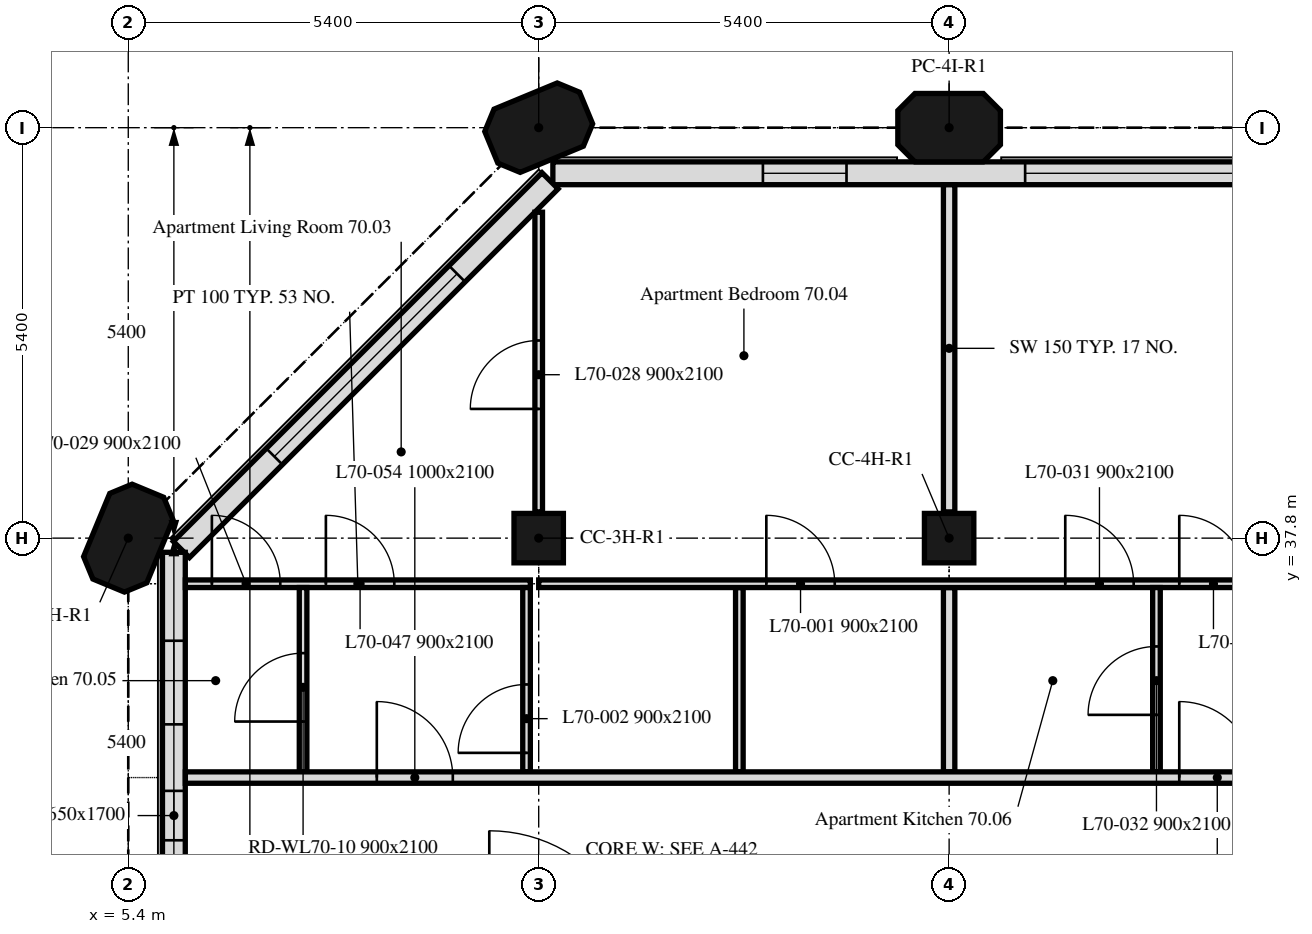
"""IFC4 building model, lengths in metres.
Left out: names, types, materials, properties, quantities, classifications, styles, units other than length and angle.
Written with IfcOpenShell. Run it as: python <this file> out.ifc"""

import sys

from ifc_helpers import new_model, si_unit, direction, frame, frame_2d, origin, origin_2d, place, context, subcontext, project, spatial, polyline, rectangle, outline, extrude, element, fill, save


model = new_model("IFC4")
c1 = context("Model", 3, precision=1e-05, world=origin(), true_north=direction((0.0, 1.0)))
c2 = subcontext(c1, "Body", "Model", "MODEL_VIEW")
j1 = project(units=[si_unit("LENGTHUNIT", "METRE"), si_unit("PLANEANGLEUNIT", "RADIAN")], contexts=[c1])
p1 = place(None, origin())
s1 = spatial("IfcSite", under=j1, at=p1, CompositionType="ELEMENT")
p2 = place(p1, origin())
s2 = spatial("IfcBuilding", under=s1, at=p2, CompositionType="ELEMENT")
p3 = place(p2, frame((0.0, 0.0, 285.1)))
s3 = spatial("IfcBuildingStorey", under=s2, at=p3, CompositionType="ELEMENT", Elevation=285.1)
p4 = place(p3, frame((5.4, 37.8, 0.0), z_axis=(0.0, 0.0, 1.0), x_axis=(0.382683432365, 0.923879532511, 0.0)))
e1 = element("IfcColumn", 1, at=p4, inside=s3, PredefinedType="COLUMN", context=c2, shape_type="SweptSolid", body=[
    extrude(outline(polyline([(-0.45, -0.45), (0.45, -0.45), (0.675, -0.225), (0.675, 0.225), (0.45, 0.45), (-0.45, 0.45), (-0.675, 0.225), (-0.675, -0.225), (-0.45, -0.45)])), origin(), (0.0, 0.0, 1.0), 3.0),
])
for number, where, z_axis, x_axis in (
    (2, (10.8, 37.8, 0.0), (0.0, 0.0, 1.0), (1.0, 0.0, 0.0)),
    (3, (16.2, 37.8, 0.0), (0.0, 0.0, 1.0), (1.0, 0.0, 0.0)),
):
    element("IfcColumn", number, at=place(p3, frame(where, z_axis=z_axis, x_axis=x_axis)), inside=s3, PredefinedType="COLUMN", context=c2, shape_type="SweptSolid", body=[
        extrude(rectangle(XDim=0.65, YDim=0.65, at=origin_2d()), origin(), (0.0, 0.0, 1.0), 3.0),
    ])
for number, where, z_axis, x_axis in (
    (4, (10.8, 43.2, 0.0), (0.0, 0.0, 1.0), (0.924, 0.383, 0.0)),
    (5, (16.2, 43.2, 0.0), (0.0, 0.0, 1.0), (1.0, 0.0, 0.0)),
):
    element("IfcColumn", number, at=place(p3, frame(where, z_axis=z_axis, x_axis=x_axis)), inside=s3, PredefinedType="COLUMN", context=c2, shape_type="SweptSolid", body=[
        extrude(outline(polyline([(-0.45, -0.45), (0.45, -0.45), (0.675, -0.225), (0.675, 0.225), (0.45, 0.45), (-0.45, 0.45), (-0.675, 0.225), (-0.675, -0.225), (-0.45, -0.45)])), origin(), (0.0, 0.0, 1.0), 3.0),
    ])
p5 = place(p3, frame((43.014, 42.6, 0.0), z_axis=(0.0, 0.0, 1.0), x_axis=(-1.0, 0.0, 0.0)))
e6 = element("IfcWall", 6, at=p5, inside=s3, PredefinedType="SOLIDWALL", context=c2, shape_type="SweptSolid", body=[
    extrude(rectangle(XDim=32.027, YDim=0.3, at=frame_2d((16.014, 0.0))), origin(), (0.0, 0.0, 1.0), 3.0),
])
p6 = place(p5, frame((0.814, 0.0, 0.9)))
e7 = element("IfcOpeningElement", 7, at=p6, cuts=e6, PredefinedType="OPENING", context=c2, shape_type="SweptSolid", body=[
    extrude(rectangle(XDim=3.4, YDim=1.7, at=frame_2d((1.7, 0.85))), frame((0.0, 0.16, 0.0), z_axis=(0.0, -1.0, 0.0), x_axis=(1.0, 0.0, 0.0)), (0.0, 0.0, 1.0), 0.32),
])
p7 = place(p5, frame((6.564, 0.0, 0.9)))
e8 = element("IfcOpeningElement", 8, at=p7, cuts=e6, PredefinedType="OPENING", context=c2, shape_type="SweptSolid", body=[
    extrude(rectangle(XDim=1.1, YDim=1.7, at=frame_2d((0.55, 0.85))), frame((0.0, 0.16, 0.0), z_axis=(0.0, -1.0, 0.0), x_axis=(1.0, 0.0, 0.0)), (0.0, 0.0, 1.0), 0.32),
])
p8 = place(p5, frame((11.614, 0.0, 0.9)))
e9 = element("IfcOpeningElement", 9, at=p8, cuts=e6, PredefinedType="OPENING", context=c2, shape_type="SweptSolid", body=[
    extrude(rectangle(XDim=3.4, YDim=1.7, at=frame_2d((1.7, 0.85))), frame((0.0, 0.16, 0.0), z_axis=(0.0, -1.0, 0.0), x_axis=(1.0, 0.0, 0.0)), (0.0, 0.0, 1.0), 0.32),
])
p9 = place(p5, frame((17.364, 0.0, 0.9)))
e10 = element("IfcOpeningElement", 10, at=p9, cuts=e6, PredefinedType="OPENING", context=c2, shape_type="SweptSolid", body=[
    extrude(rectangle(XDim=1.1, YDim=1.7, at=frame_2d((0.55, 0.85))), frame((0.0, 0.16, 0.0), z_axis=(0.0, -1.0, 0.0), x_axis=(1.0, 0.0, 0.0)), (0.0, 0.0, 1.0), 0.32),
])
p10 = place(p5, frame((22.414, 0.0, 0.9)))
e11 = element("IfcOpeningElement", 11, at=p10, cuts=e6, PredefinedType="OPENING", context=c2, shape_type="SweptSolid", body=[
    extrude(rectangle(XDim=3.4, YDim=1.7, at=frame_2d((1.7, 0.85))), frame((0.0, 0.16, 0.0), z_axis=(0.0, -1.0, 0.0), x_axis=(1.0, 0.0, 0.0)), (0.0, 0.0, 1.0), 0.32),
])
p11 = place(p5, frame((28.164, 0.0, 0.9)))
e12 = element("IfcOpeningElement", 12, at=p11, cuts=e6, PredefinedType="OPENING", context=c2, shape_type="SweptSolid", body=[
    extrude(rectangle(XDim=1.1, YDim=1.7, at=frame_2d((0.55, 0.85))), frame((0.0, 0.16, 0.0), z_axis=(0.0, -1.0, 0.0), x_axis=(1.0, 0.0, 0.0)), (0.0, 0.0, 1.0), 0.32),
])
p12 = place(p3, frame((10.949, 42.501, 0.0), z_axis=(0.0, 0.0, 1.0), x_axis=(-0.707106781187, -0.707106781187, 0.0)))
e13 = element("IfcWall", 13, at=p12, inside=s3, PredefinedType="SOLIDWALL", context=c2, shape_type="SweptSolid", body=[
    extrude(rectangle(XDim=6.86, YDim=0.3, at=frame_2d((3.43, 0.0))), origin(), (0.0, 0.0, 1.0), 3.0),
])
p13 = place(p12, frame((1.73, 0.0, 0.9)))
e14 = element("IfcOpeningElement", 14, at=p13, cuts=e13, PredefinedType="OPENING", context=c2, shape_type="SweptSolid", body=[
    extrude(rectangle(XDim=3.4, YDim=1.7, at=frame_2d((1.7, 0.85))), frame((0.0, 0.16, 0.0), z_axis=(0.0, -1.0, 0.0), x_axis=(1.0, 0.0, 0.0)), (0.0, 0.0, 1.0), 0.32),
])
p14 = place(p3, frame((6.0, 37.614, 0.0), z_axis=(0.0, 0.0, 1.0), x_axis=(0.0, -1.0, 0.0)))
e15 = element("IfcWall", 15, at=p14, inside=s3, PredefinedType="SOLIDWALL", context=c2, shape_type="SweptSolid", body=[
    extrude(rectangle(XDim=5.214, YDim=0.3, at=frame_2d((2.607, 0.0))), origin(), (0.0, 0.0, 1.0), 3.0),
])
p15 = place(p14, frame((1.164, 0.0, 0.9)))
e16 = element("IfcOpeningElement", 16, at=p15, cuts=e15, PredefinedType="OPENING", context=c2, shape_type="SweptSolid", body=[
    extrude(rectangle(XDim=1.1, YDim=1.7, at=frame_2d((0.55, 0.85))), frame((0.0, 0.16, 0.0), z_axis=(0.0, -1.0, 0.0), x_axis=(1.0, 0.0, 0.0)), (0.0, 0.0, 1.0), 0.32),
])
p16 = place(p14, frame((3.139, 0.0, 0.9)))
e17 = element("IfcOpeningElement", 17, at=p16, cuts=e15, PredefinedType="OPENING", context=c2, shape_type="SweptSolid", body=[
    extrude(rectangle(XDim=0.65, YDim=1.7, at=frame_2d((0.325, 0.85))), frame((0.0, 0.16, 0.0), z_axis=(0.0, -1.0, 0.0), x_axis=(1.0, 0.0, 0.0)), (0.0, 0.0, 1.0), 0.32),
])
p17 = place(p3, frame((6.151, 37.2, 0.0), z_axis=(0.0, 0.0, 1.0), x_axis=(1.0, 0.0, 0.0)))
e18 = element("IfcWall", 18, at=p17, inside=s3, PredefinedType="PARTITIONING", context=c2, shape_type="SweptSolid", body=[
    extrude(rectangle(XDim=4.539, YDim=0.1, at=frame_2d((2.27, 0.0))), origin(), (0.0, 0.0, 1.0), 3.0),
])
p18 = place(p17, frame((0.349, 0.0, 0.0)))
e19 = element("IfcOpeningElement", 19, at=p18, cuts=e18, PredefinedType="OPENING", context=c2, shape_type="SweptSolid", body=[
    extrude(rectangle(XDim=0.9, YDim=2.1, at=frame_2d((0.45, 1.05))), frame((0.0, 0.05, 0.0), z_axis=(0.0, -1.0, 0.0), x_axis=(1.0, 0.0, 0.0)), (0.0, 0.0, 1.0), 0.1),
])
p19 = place(p17, frame((1.849, 0.0, 0.0)))
e20 = element("IfcOpeningElement", 20, at=p19, cuts=e18, PredefinedType="OPENING", context=c2, shape_type="SweptSolid", body=[
    extrude(rectangle(XDim=0.9, YDim=2.1, at=frame_2d((0.45, 1.05))), frame((0.0, 0.05, 0.0), z_axis=(0.0, -1.0, 0.0), x_axis=(1.0, 0.0, 0.0)), (0.0, 0.0, 1.0), 0.1),
])
p20 = place(p3, frame((10.8, 38.145, 0.0), z_axis=(0.0, 0.0, 1.0), x_axis=(0.0, 1.0, 0.0)))
e21 = element("IfcWall", 21, at=p20, inside=s3, PredefinedType="PARTITIONING", context=c2, shape_type="SweptSolid", body=[
    extrude(rectangle(XDim=3.943, YDim=0.1, at=frame_2d((1.971, 0.0))), origin(), (0.0, 0.0, 1.0), 3.0),
])
p21 = place(p20, frame((1.355, 0.0, 0.0)))
e22 = element("IfcOpeningElement", 22, at=p21, cuts=e21, PredefinedType="OPENING", context=c2, shape_type="SweptSolid", body=[
    extrude(rectangle(XDim=0.9, YDim=2.1, at=frame_2d((0.45, 1.05))), frame((0.0, 0.05, 0.0), z_axis=(0.0, -1.0, 0.0), x_axis=(1.0, 0.0, 0.0)), (0.0, 0.0, 1.0), 0.1),
])
p22 = place(p3, frame((16.2, 38.145, 0.0), z_axis=(0.0, 0.0, 1.0), x_axis=(0.0, 1.0, 0.0)))
e23 = element("IfcWall", 23, at=p22, inside=s3, PredefinedType="PARTITIONING", context=c2, shape_type="SweptSolid", body=[
    extrude(rectangle(XDim=4.304, YDim=0.15, at=frame_2d((2.152, 0.0))), origin(), (0.0, 0.0, 1.0), 2.4),
])
p23 = place(p3, frame((7.7, 34.725, 0.0), z_axis=(0.0, 0.0, 1.0), x_axis=(0.0, 1.0, 0.0)))
e24 = element("IfcWall", 24, at=p23, inside=s3, PredefinedType="PARTITIONING", context=c2, shape_type="SweptSolid", body=[
    extrude(rectangle(XDim=2.425, YDim=0.1, at=frame_2d((1.212, 0.0))), origin(), (0.0, 0.0, 1.0), 3.0),
])
p24 = place(p23, frame((0.662, 0.0, 0.0)))
e25 = element("IfcOpeningElement", 25, at=p24, cuts=e24, PredefinedType="OPENING", context=c2, shape_type="SweptSolid", body=[
    extrude(rectangle(XDim=0.9, YDim=2.1, at=frame_2d((0.45, 1.05))), frame((0.0, 0.05, 0.0), z_axis=(0.0, -1.0, 0.0), x_axis=(1.0, 0.0, 0.0)), (0.0, 0.0, 1.0), 0.1),
])
p25 = place(p3, frame((10.64, 34.725, 0.0), z_axis=(0.0, 0.0, 1.0), x_axis=(0.0, 1.0, 0.0)))
e26 = element("IfcWall", 26, at=p25, inside=s3, PredefinedType="PARTITIONING", context=c2, shape_type="SweptSolid", body=[
    extrude(rectangle(XDim=2.425, YDim=0.1, at=frame_2d((1.212, 0.0))), origin(), (0.0, 0.0, 1.0), 3.0),
])
p26 = place(p25, frame((0.25, 0.0, 0.0)))
e27 = element("IfcOpeningElement", 27, at=p26, cuts=e26, PredefinedType="OPENING", context=c2, shape_type="SweptSolid", body=[
    extrude(rectangle(XDim=0.9, YDim=2.1, at=frame_2d((0.45, 1.05))), frame((0.0, 0.05, 0.0), z_axis=(0.0, -1.0, 0.0), x_axis=(1.0, 0.0, 0.0)), (0.0, 0.0, 1.0), 0.1),
])
p27 = place(p3, frame((13.44, 34.725, 0.0), z_axis=(0.0, 0.0, 1.0), x_axis=(0.0, 1.0, 0.0)))
e28 = element("IfcWall", 28, at=p27, inside=s3, PredefinedType="PARTITIONING", context=c2, shape_type="SweptSolid", body=[
    extrude(rectangle(XDim=2.425, YDim=0.1, at=frame_2d((1.212, 0.0))), origin(), (0.0, 0.0, 1.0), 3.0),
])
p28 = place(p3, frame((16.2, 34.725, 0.0), z_axis=(0.0, 0.0, 1.0), x_axis=(0.0, 1.0, 0.0)))
e29 = element("IfcWall", 29, at=p28, inside=s3, PredefinedType="PARTITIONING", context=c2, shape_type="SweptSolid", body=[
    extrude(rectangle(XDim=2.425, YDim=0.15, at=frame_2d((1.212, 0.0))), origin(), (0.0, 0.0, 1.0), 2.4),
])
p29 = place(p3, frame((10.8, 37.2, 0.0), z_axis=(0.0, 0.0, 1.0), x_axis=(1.0, 0.0, 0.0)))
e30 = element("IfcWall", 30, at=p29, inside=s3, PredefinedType="PARTITIONING", context=c2, shape_type="SweptSolid", body=[
    extrude(rectangle(XDim=16.2, YDim=0.1, at=frame_2d((8.1, 0.0))), origin(), (0.0, 0.0, 1.0), 2.4),
])
p30 = place(p29, frame((2.995, 0.0, 0.0)))
e31 = element("IfcOpeningElement", 31, at=p30, cuts=e30, PredefinedType="OPENING", context=c2, shape_type="SweptSolid", body=[
    extrude(rectangle(XDim=0.9, YDim=2.1, at=frame_2d((0.45, 1.05))), frame((0.0, 0.05, 0.0), z_axis=(0.0, -1.0, 0.0), x_axis=(1.0, 0.0, 0.0)), (0.0, 0.0, 1.0), 0.1),
])
p31 = place(p29, frame((13.996, 0.0, 0.0)))
e32 = element("IfcOpeningElement", 32, at=p31, cuts=e30, PredefinedType="OPENING", context=c2, shape_type="SweptSolid", body=[
    extrude(rectangle(XDim=0.9, YDim=2.1, at=frame_2d((0.45, 1.05))), frame((0.0, 0.05, 0.0), z_axis=(0.0, -1.0, 0.0), x_axis=(1.0, 0.0, 0.0)), (0.0, 0.0, 1.0), 0.1),
])
p32 = place(p29, frame((6.928, 0.0, 0.0)))
e33 = element("IfcOpeningElement", 33, at=p32, cuts=e30, PredefinedType="OPENING", context=c2, shape_type="SweptSolid", body=[
    extrude(rectangle(XDim=0.9, YDim=2.1, at=frame_2d((0.45, 1.05))), frame((0.0, 0.05, 0.0), z_axis=(0.0, -1.0, 0.0), x_axis=(1.0, 0.0, 0.0)), (0.0, 0.0, 1.0), 0.1),
])
p33 = place(p29, frame((8.428, 0.0, 0.0)))
e34 = element("IfcOpeningElement", 34, at=p33, cuts=e30, PredefinedType="OPENING", context=c2, shape_type="SweptSolid", body=[
    extrude(rectangle(XDim=0.9, YDim=2.1, at=frame_2d((0.45, 1.05))), frame((0.0, 0.05, 0.0), z_axis=(0.0, -1.0, 0.0), x_axis=(1.0, 0.0, 0.0)), (0.0, 0.0, 1.0), 0.1),
])
p34 = place(p3, frame((18.928, 34.725, 0.0), z_axis=(0.0, 0.0, 1.0), x_axis=(0.0, 1.0, 0.0)))
e35 = element("IfcWall", 35, at=p34, inside=s3, PredefinedType="PARTITIONING", context=c2, shape_type="SweptSolid", body=[
    extrude(rectangle(XDim=2.425, YDim=0.1, at=frame_2d((1.212, 0.0))), origin(), (0.0, 0.0, 1.0), 3.0),
])
p35 = place(p34, frame((0.75, 0.0, 0.0)))
e36 = element("IfcOpeningElement", 36, at=p35, cuts=e35, PredefinedType="OPENING", context=c2, shape_type="SweptSolid", body=[
    extrude(rectangle(XDim=0.9, YDim=2.1, at=frame_2d((0.45, 1.05))), frame((0.0, 0.05, 0.0), z_axis=(0.0, -1.0, 0.0), x_axis=(1.0, 0.0, 0.0)), (0.0, 0.0, 1.0), 0.1),
])
p36 = place(p3, frame((6.151, 34.65, 0.0), z_axis=(0.0, 0.0, 1.0), x_axis=(1.0, 0.0, 0.0)))
e37 = element("IfcWall", 37, at=p36, inside=s3, PredefinedType="PARTITIONING", context=c2, shape_type="SweptSolid", body=[
    extrude(rectangle(XDim=41.698, YDim=0.15, at=frame_2d((20.849, 0.0))), origin(), (0.0, 0.0, 1.0), 2.4),
])
p37 = place(p36, frame((2.519, 0.0, 0.0)))
e38 = element("IfcOpeningElement", 38, at=p37, cuts=e37, PredefinedType="OPENING", context=c2, shape_type="SweptSolid", body=[
    extrude(rectangle(XDim=1.0, YDim=2.1, at=frame_2d((0.5, 1.05))), frame((0.0, 0.075, 0.0), z_axis=(0.0, -1.0, 0.0), x_axis=(1.0, 0.0, 0.0)), (0.0, 0.0, 1.0), 0.15),
])
p38 = place(p36, frame((13.077, 0.0, 0.0)))
e39 = element("IfcOpeningElement", 39, at=p38, cuts=e37, PredefinedType="OPENING", context=c2, shape_type="SweptSolid", body=[
    extrude(rectangle(XDim=1.0, YDim=2.1, at=frame_2d((0.5, 1.05))), frame((0.0, 0.075, 0.0), z_axis=(0.0, -1.0, 0.0), x_axis=(1.0, 0.0, 0.0)), (0.0, 0.0, 1.0), 0.15),
])
p39 = place(p36, frame((32.649, 0.0, 0.0)))
e40 = element("IfcOpeningElement", 40, at=p39, cuts=e37, PredefinedType="OPENING", context=c2, shape_type="SweptSolid", body=[
    extrude(rectangle(XDim=1.0, YDim=2.1, at=frame_2d((0.5, 1.05))), frame((0.0, 0.075, 0.0), z_axis=(0.0, -1.0, 0.0), x_axis=(1.0, 0.0, 0.0)), (0.0, 0.0, 1.0), 0.15),
])
p40 = place(p10, origin())
e41 = element("IfcWindow", 41, at=p40, inside=s3, PartitioningType="SINGLE_PANEL", PredefinedType="WINDOW", context=c2, shape_type="SweptSolid", body=[
    extrude(rectangle(XDim=3.4, YDim=1.7, at=frame_2d((1.7, 0.85))), frame((0.0, 0.03, 0.0), z_axis=(0.0, -1.0, 0.0), x_axis=(1.0, 0.0, 0.0)), (0.0, 0.0, 1.0), 0.06),
])
fill(e11, e41)
p41 = place(p11, origin())
e42 = element("IfcWindow", 42, at=p41, inside=s3, PartitioningType="SINGLE_PANEL", PredefinedType="WINDOW", context=c2, shape_type="SweptSolid", body=[
    extrude(rectangle(XDim=1.1, YDim=1.7, at=frame_2d((0.55, 0.85))), frame((0.0, 0.03, 0.0), z_axis=(0.0, -1.0, 0.0), x_axis=(1.0, 0.0, 0.0)), (0.0, 0.0, 1.0), 0.06),
])
fill(e12, e42)
p42 = place(p13, origin())
e43 = element("IfcWindow", 43, at=p42, inside=s3, PartitioningType="SINGLE_PANEL", PredefinedType="WINDOW", context=c2, shape_type="SweptSolid", body=[
    extrude(rectangle(XDim=3.4, YDim=1.7, at=frame_2d((1.7, 0.85))), frame((0.0, 0.03, 0.0), z_axis=(0.0, -1.0, 0.0), x_axis=(1.0, 0.0, 0.0)), (0.0, 0.0, 1.0), 0.06),
])
fill(e14, e43)
p43 = place(p15, origin())
e44 = element("IfcWindow", 44, at=p43, inside=s3, PartitioningType="SINGLE_PANEL", PredefinedType="WINDOW", context=c2, shape_type="SweptSolid", body=[
    extrude(rectangle(XDim=1.1, YDim=1.7, at=frame_2d((0.55, 0.85))), frame((0.0, 0.03, 0.0), z_axis=(0.0, -1.0, 0.0), x_axis=(1.0, 0.0, 0.0)), (0.0, 0.0, 1.0), 0.06),
])
fill(e16, e44)
p44 = place(p16, origin())
e45 = element("IfcWindow", 45, at=p44, inside=s3, PartitioningType="SINGLE_PANEL", PredefinedType="WINDOW", context=c2, shape_type="SweptSolid", body=[
    extrude(rectangle(XDim=0.65, YDim=1.7, at=frame_2d((0.325, 0.85))), frame((0.0, 0.03, 0.0), z_axis=(0.0, -1.0, 0.0), x_axis=(1.0, 0.0, 0.0)), (0.0, 0.0, 1.0), 0.06),
])
fill(e17, e45)
p45 = place(p30, origin())
e46 = element("IfcDoor", 46, at=p45, inside=s3, OperationType="SINGLE_SWING_RIGHT", PredefinedType="DOOR", context=c2, shape_type="SweptSolid", body=[
    extrude(rectangle(XDim=0.9, YDim=2.1, at=frame_2d((0.45, 1.05))), frame((0.0, 0.025, 0.0), z_axis=(0.0, -1.0, 0.0), x_axis=(1.0, 0.0, 0.0)), (0.0, 0.0, 1.0), 0.05),
])
fill(e31, e46)
p46 = place(p26, origin())
e47 = element("IfcDoor", 47, at=p46, inside=s3, OperationType="SINGLE_SWING_RIGHT", PredefinedType="DOOR", context=c2, shape_type="SweptSolid", body=[
    extrude(rectangle(XDim=0.9, YDim=2.1, at=frame_2d((0.45, 1.05))), frame((0.0, 0.025, 0.0), z_axis=(0.0, -1.0, 0.0), x_axis=(1.0, 0.0, 0.0)), (0.0, 0.0, 1.0), 0.05),
])
fill(e27, e47)
p47 = place(p21, origin())
e48 = element("IfcDoor", 48, at=p47, inside=s3, OperationType="SINGLE_SWING_LEFT", PredefinedType="DOOR", context=c2, shape_type="SweptSolid", body=[
    extrude(rectangle(XDim=0.9, YDim=2.1, at=frame_2d((0.45, 1.05))), frame((0.0, 0.025, 0.0), z_axis=(0.0, -1.0, 0.0), x_axis=(1.0, 0.0, 0.0)), (0.0, 0.0, 1.0), 0.05),
])
fill(e22, e48)
p48 = place(p18, origin())
e49 = element("IfcDoor", 49, at=p48, inside=s3, OperationType="SINGLE_SWING_LEFT", PredefinedType="DOOR", context=c2, shape_type="SweptSolid", body=[
    extrude(rectangle(XDim=0.9, YDim=2.1, at=frame_2d((0.45, 1.05))), frame((0.0, 0.025, 0.0), z_axis=(0.0, -1.0, 0.0), x_axis=(1.0, 0.0, 0.0)), (0.0, 0.0, 1.0), 0.05),
])
fill(e19, e49)
p49 = place(p24, origin())
e50 = element("IfcDoor", 50, at=p49, inside=s3, OperationType="SINGLE_SWING_RIGHT", PredefinedType="DOOR", context=c2, shape_type="SweptSolid", body=[
    extrude(rectangle(XDim=0.9, YDim=2.1, at=frame_2d((0.45, 1.05))), frame((0.0, 0.025, 0.0), z_axis=(0.0, -1.0, 0.0), x_axis=(1.0, 0.0, 0.0)), (0.0, 0.0, 1.0), 0.05),
])
fill(e25, e50)
p50 = place(p32, origin())
e51 = element("IfcDoor", 51, at=p50, inside=s3, OperationType="SINGLE_SWING_LEFT", PredefinedType="DOOR", context=c2, shape_type="SweptSolid", body=[
    extrude(rectangle(XDim=0.9, YDim=2.1, at=frame_2d((0.45, 1.05))), frame((0.0, 0.025, 0.0), z_axis=(0.0, -1.0, 0.0), x_axis=(1.0, 0.0, 0.0)), (0.0, 0.0, 1.0), 0.05),
])
fill(e33, e51)
p51 = place(p35, origin())
e52 = element("IfcDoor", 52, at=p51, inside=s3, OperationType="SINGLE_SWING_LEFT", PredefinedType="DOOR", context=c2, shape_type="SweptSolid", body=[
    extrude(rectangle(XDim=0.9, YDim=2.1, at=frame_2d((0.45, 1.05))), frame((0.0, 0.025, 0.0), z_axis=(0.0, -1.0, 0.0), x_axis=(1.0, 0.0, 0.0)), (0.0, 0.0, 1.0), 0.05),
])
fill(e36, e52)
p52 = place(p19, origin())
e53 = element("IfcDoor", 53, at=p52, inside=s3, OperationType="SINGLE_SWING_RIGHT", PredefinedType="DOOR", context=c2, shape_type="SweptSolid", body=[
    extrude(rectangle(XDim=0.9, YDim=2.1, at=frame_2d((0.45, 1.05))), frame((0.0, 0.025, 0.0), z_axis=(0.0, -1.0, 0.0), x_axis=(1.0, 0.0, 0.0)), (0.0, 0.0, 1.0), 0.05),
])
fill(e20, e53)
p53 = place(p37, origin())
e54 = element("IfcDoor", 54, at=p53, inside=s3, OperationType="SINGLE_SWING_RIGHT", PredefinedType="DOOR", context=c2, shape_type="SweptSolid", body=[
    extrude(rectangle(XDim=1.0, YDim=2.1, at=frame_2d((0.5, 1.05))), frame((0.0, 0.025, 0.0), z_axis=(0.0, -1.0, 0.0), x_axis=(1.0, 0.0, 0.0)), (0.0, 0.0, 1.0), 0.05),
])
fill(e38, e54)
p54 = place(p33, origin())
e55 = element("IfcDoor", 55, at=p54, inside=s3, OperationType="SINGLE_SWING_RIGHT", PredefinedType="DOOR", context=c2, shape_type="SweptSolid", body=[
    extrude(rectangle(XDim=0.9, YDim=2.1, at=frame_2d((0.45, 1.05))), frame((0.0, 0.025, 0.0), z_axis=(0.0, -1.0, 0.0), x_axis=(1.0, 0.0, 0.0)), (0.0, 0.0, 1.0), 0.05),
])
fill(e34, e55)
p55 = place(p38, origin())
e56 = element("IfcDoor", 56, at=p55, inside=s3, OperationType="SINGLE_SWING_RIGHT", PredefinedType="DOOR", context=c2, shape_type="SweptSolid", body=[
    extrude(rectangle(XDim=1.0, YDim=2.1, at=frame_2d((0.5, 1.05))), frame((0.0, 0.025, 0.0), z_axis=(0.0, -1.0, 0.0), x_axis=(1.0, 0.0, 0.0)), (0.0, 0.0, 1.0), 0.05),
])
fill(e39, e56)
save(model, sys.argv[1])
